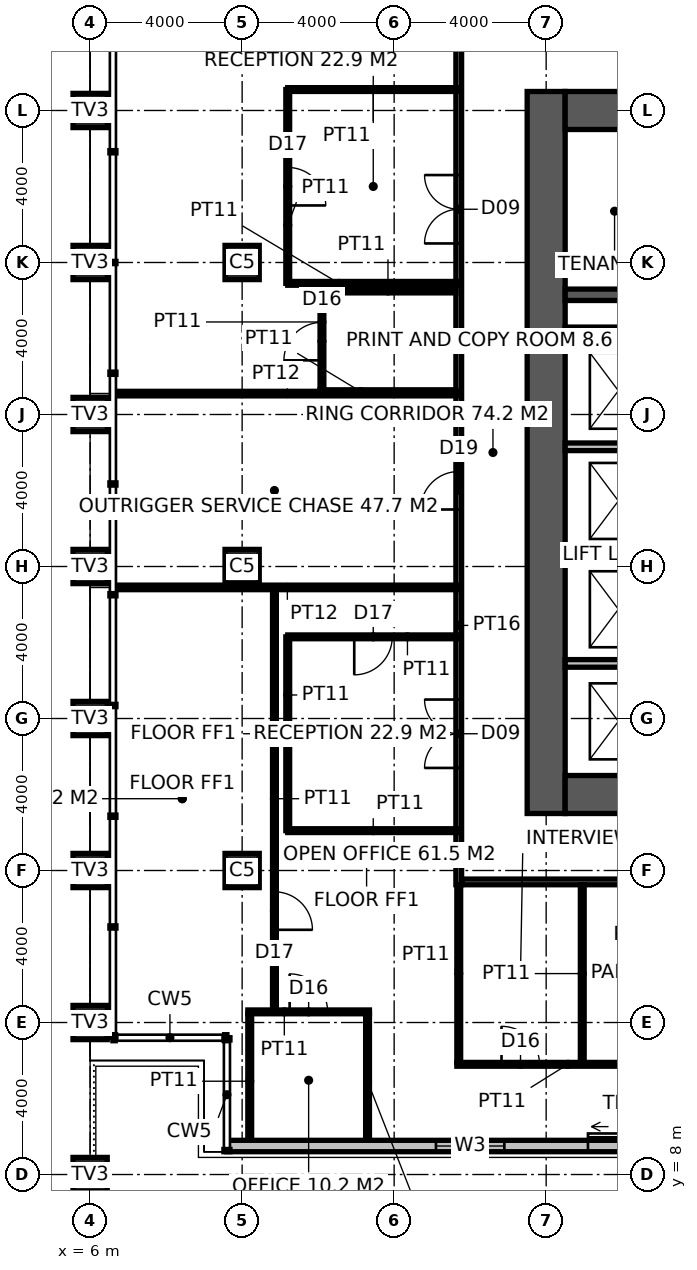
"""IFC4 building model, lengths in metres.
Left out: names, types, materials, properties, quantities, classifications, styles, units other than length and angle.
Written with IfcOpenShell. Run it as: python <this file> out.ifc"""

import sys

from ifc_helpers import new_model, si_unit, direction, frame, frame_2d, origin, origin_2d, place, context, subcontext, project, spatial, rectangle, hollow_rectangle, extrude, element, fill, save


model = new_model("IFC4")
c1 = context("Model", 3, precision=1e-05, world=origin(), true_north=direction((0.0, 1.0)))
c2 = subcontext(c1, "Body", "Model", "MODEL_VIEW")
j1 = project(units=[si_unit("LENGTHUNIT", "METRE"), si_unit("PLANEANGLEUNIT", "RADIAN")], contexts=[c1])
p1 = place(None, origin())
s1 = spatial("IfcSite", under=j1, at=p1, CompositionType="ELEMENT")
p2 = place(p1, origin())
s2 = spatial("IfcBuilding", under=s1, at=p2, CompositionType="ELEMENT")
p3 = place(p2, frame((0.0, 0.0, 171.8)))
s3 = spatial("IfcBuildingStorey", under=s2, at=p3, CompositionType="ELEMENT", Elevation=171.8)
for number, where, z_axis, x_axis in (
    (1, (6.0, 8.0, 0.0), (0.0, 0.0, 1.0), (1.0, 0.0, 0.0)),
    (2, (6.0, 12.0, 0.0), (0.0, 0.0, 1.0), (1.0, 0.0, 0.0)),
    (3, (6.0, 16.0, 0.0), (0.0, 0.0, 1.0), (1.0, 0.0, 0.0)),
    (4, (6.0, 20.0, 0.0), (0.0, 0.0, 1.0), (1.0, 0.0, 0.0)),
    (5, (6.0, 24.0, 0.0), (0.0, 0.0, 1.0), (1.0, 0.0, 0.0)),
    (6, (6.0, 28.0, 0.0), (0.0, 0.0, 1.0), (1.0, 0.0, 0.0)),
    (7, (6.0, 32.0, 0.0), (0.0, 0.0, 1.0), (1.0, 0.0, 0.0)),
    (8, (6.0, 36.0, 0.0), (0.0, 0.0, 1.0), (1.0, 0.0, 0.0)),
):
    element("IfcColumn", number, at=place(p3, frame(where, z_axis=z_axis, x_axis=x_axis)), inside=s3, PredefinedType="USERDEFINED", context=c2, shape_type="SweptSolid", body=[
        extrude(hollow_rectangle(XDim=0.9, YDim=0.9, WallThickness=0.08, at=origin_2d()), origin(), (0.0, 0.0, 1.0), 4.0),
    ])
for number, where, z_axis, x_axis in (
    (9, (10.0, 16.0, 0.0), (0.0, 0.0, 1.0), (1.0, 0.0, 0.0)),
    (10, (10.0, 24.0, 0.0), (0.0, 0.0, 1.0), (1.0, 0.0, 0.0)),
    (11, (10.0, 32.0, 0.0), (0.0, 0.0, 1.0), (1.0, 0.0, 0.0)),
):
    element("IfcColumn", number, at=place(p3, frame(where, z_axis=z_axis, x_axis=x_axis)), inside=s3, PredefinedType="COLUMN", context=c2, shape_type="SweptSolid", body=[
        extrude(hollow_rectangle(XDim=0.9, YDim=0.9, WallThickness=0.1, at=origin_2d()), origin(), (0.0, 0.0, 1.0), 4.0),
    ])
p4 = place(p3, frame((18.0, 17.5, -0.15), z_axis=(0.0, 0.0, 1.0), x_axis=(0.0, 1.0, 0.0)))
e12 = element("IfcWall", 12, at=p4, inside=s3, PredefinedType="SHEAR", context=c2, shape_type="SweptSolid", body=[
    extrude(rectangle(XDim=19.0, YDim=1.0, at=frame_2d((9.5, 0.0))), origin(), (0.0, 0.0, 1.0), 4.0),
])
p5 = place(p3, frame((18.5, 18.0, -0.15), z_axis=(0.0, 0.0, 1.0), x_axis=(1.0, 0.0, 0.0)))
e13 = element("IfcWall", 13, at=p5, inside=s3, PredefinedType="SHEAR", context=c2, shape_type="SweptSolid", body=[
    extrude(rectangle(XDim=17.6, YDim=1.0, at=frame_2d((8.8, 0.0))), origin(), (0.0, 0.0, 1.0), 4.0),
])
p6 = place(p5, frame((3.45, 0.0, 0.15)))
e14 = element("IfcOpeningElement", 14, at=p6, cuts=e13, PredefinedType="OPENING", context=c2, shape_type="SweptSolid", body=[
    extrude(rectangle(XDim=1.5, YDim=2.4, at=frame_2d((0.75, 1.2))), frame((0.0, 0.51, 0.0), z_axis=(0.0, -1.0, 0.0), x_axis=(1.0, 0.0, 0.0)), (0.0, 0.0, 1.0), 1.02),
])
p7 = place(p3, frame((18.5, 36.0, -0.15), z_axis=(0.0, 0.0, 1.0), x_axis=(1.0, 0.0, 0.0)))
e15 = element("IfcWall", 15, at=p7, inside=s3, PredefinedType="SHEAR", context=c2, shape_type="SweptSolid", body=[
    extrude(rectangle(XDim=17.6, YDim=1.0, at=frame_2d((8.8, 0.0))), origin(), (0.0, 0.0, 1.0), 4.0),
])
p8 = place(p3, frame((18.5, 31.15, -0.15), z_axis=(0.0, 0.0, 1.0), x_axis=(1.0, 0.0, 0.0)))
e16 = element("IfcWall", 16, at=p8, inside=s3, PredefinedType="SHEAR", context=c2, shape_type="SweptSolid", body=[
    extrude(rectangle(XDim=5.35, YDim=0.3, at=frame_2d((2.675, 0.0))), origin(), (0.0, 0.0, 1.0), 4.0),
])
p9 = place(p8, frame((3.4, 0.0, 0.15)))
e17 = element("IfcOpeningElement", 17, at=p9, cuts=e16, PredefinedType="OPENING", context=c2, shape_type="SweptSolid", body=[
    extrude(rectangle(XDim=1.0, YDim=2.2, at=frame_2d((0.5, 1.1))), frame((0.0, 0.16, 0.0), z_axis=(0.0, -1.0, 0.0), x_axis=(1.0, 0.0, 0.0)), (0.0, 0.0, 1.0), 0.32),
])
p10 = place(p3, frame((18.5, 30.15, -0.15), z_axis=(0.0, 0.0, 1.0), x_axis=(1.0, 0.0, 0.0)))
e18 = element("IfcWall", 18, at=p10, inside=s3, PredefinedType="SHEAR", context=c2, shape_type="SweptSolid", body=[
    extrude(rectangle(XDim=2.7, YDim=0.3, at=frame_2d((1.35, 0.0))), origin(), (0.0, 0.0, 1.0), 4.0),
])
for number, where, z_axis, x_axis in (
    (19, (18.5, 21.45, -0.15), (0.0, 0.0, 1.0), (1.0, 0.0, 0.0)),
    (20, (18.5, 24.3, -0.15), (0.0, 0.0, 1.0), (1.0, 0.0, 0.0)),
    (21, (18.5, 27.15, -0.15), (0.0, 0.0, 1.0), (1.0, 0.0, 0.0)),
):
    element("IfcWall", number, at=place(p3, frame(where, z_axis=z_axis, x_axis=x_axis)), inside=s3, PredefinedType="SOLIDWALL", context=c2, shape_type="SweptSolid", body=[
        extrude(rectangle(XDim=2.7, YDim=0.2, at=frame_2d((1.35, 0.0))), origin(), (0.0, 0.0, 1.0), 4.0),
    ])
p11 = place(p3, frame((15.7, 15.625, 0.0), z_axis=(0.0, 0.0, 1.0), x_axis=(0.0, 1.0, 0.0)))
e22 = element("IfcWall", 22, at=p11, inside=s3, PredefinedType="PARTITIONING", context=c2, shape_type="SweptSolid", body=[
    extrude(rectangle(XDim=22.75, YDim=0.15, at=frame_2d((11.375, 0.0))), origin(), (0.0, 0.0, 1.0), 3.85),
])
p12 = place(p11, frame((3.074, 0.0, 0.0)))
e23 = element("IfcOpeningElement", 23, at=p12, cuts=e22, PredefinedType="OPENING", context=c2, shape_type="SweptSolid", body=[
    extrude(rectangle(XDim=1.8, YDim=2.4, at=frame_2d((0.9, 1.2))), frame((0.0, 0.085, 0.0), z_axis=(0.0, -1.0, 0.0), x_axis=(1.0, 0.0, 0.0)), (0.0, 0.0, 1.0), 0.17),
])
p13 = place(p11, frame((16.876, 0.0, 0.0)))
e24 = element("IfcOpeningElement", 24, at=p13, cuts=e22, PredefinedType="OPENING", context=c2, shape_type="SweptSolid", body=[
    extrude(rectangle(XDim=1.8, YDim=2.4, at=frame_2d((0.9, 1.2))), frame((0.0, 0.085, 0.0), z_axis=(0.0, -1.0, 0.0), x_axis=(1.0, 0.0, 0.0)), (0.0, 0.0, 1.0), 0.17),
])
p14 = place(p11, frame((9.875, 0.0, 0.0)))
e25 = element("IfcOpeningElement", 25, at=p14, cuts=e22, PredefinedType="OPENING", context=c2, shape_type="SweptSolid", body=[
    extrude(rectangle(XDim=1.0, YDim=2.2, at=frame_2d((0.5, 1.1))), frame((0.0, 0.085, 0.0), z_axis=(0.0, -1.0, 0.0), x_axis=(1.0, 0.0, 0.0)), (0.0, 0.0, 1.0), 0.17),
])
p15 = place(p3, frame((15.775, 15.7, 0.0), z_axis=(0.0, 0.0, 1.0), x_axis=(1.0, 0.0, 0.0)))
e26 = element("IfcWall", 26, at=p15, inside=s3, PredefinedType="PARTITIONING", context=c2, shape_type="SweptSolid", body=[
    extrude(rectangle(XDim=22.05, YDim=0.15, at=frame_2d((11.025, 0.0))), origin(), (0.0, 0.0, 1.0), 3.85),
])
p16 = place(p15, frame((11.725, 0.0, 0.0)))
e27 = element("IfcOpeningElement", 27, at=p16, cuts=e26, PredefinedType="OPENING", context=c2, shape_type="SweptSolid", body=[
    extrude(rectangle(XDim=1.0, YDim=2.2, at=frame_2d((0.5, 1.1))), frame((0.0, 0.085, 0.0), z_axis=(0.0, -1.0, 0.0), x_axis=(1.0, 0.0, 0.0)), (0.0, 0.0, 1.0), 0.17),
])
for number, where, z_axis, x_axis in (
    (28, (6.68, 23.45, 0.0), (0.0, 0.0, 1.0), (1.0, 0.0, 0.0)),
    (29, (6.68, 28.55, 0.0), (0.0, 0.0, 1.0), (1.0, 0.0, 0.0)),
):
    element("IfcWall", number, at=place(p3, frame(where, z_axis=z_axis, x_axis=x_axis)), inside=s3, PredefinedType="PARTITIONING", context=c2, shape_type="SweptSolid", body=[
        extrude(rectangle(XDim=9.02, YDim=0.12, at=frame_2d((4.51, 0.0))), origin(), (0.0, 0.0, 1.0), 2.65),
    ])
p17 = place(p3, frame((15.65, 10.9, 0.0), z_axis=(0.0, 0.0, 1.0), x_axis=(1.0, 0.0, 0.0)))
e30 = element("IfcWall", 30, at=p17, inside=s3, PredefinedType="PARTITIONING", context=c2, shape_type="SweptSolid", body=[
    extrude(rectangle(XDim=9.739, YDim=0.1, at=frame_2d((4.87, 0.0))), origin(), (0.0, 0.0, 1.0), 3.85),
])
p18 = place(p17, frame((1.175, 0.0, 0.0)))
e31 = element("IfcOpeningElement", 31, at=p18, cuts=e30, PredefinedType="OPENING", context=c2, shape_type="SweptSolid", body=[
    extrude(rectangle(XDim=1.0, YDim=2.2, at=frame_2d((0.5, 1.1))), frame((0.0, 0.06, 0.0), z_axis=(0.0, -1.0, 0.0), x_axis=(1.0, 0.0, 0.0)), (0.0, 0.0, 1.0), 0.12),
])
p19 = place(p17, frame((4.5, 0.0, 0.0)))
e32 = element("IfcOpeningElement", 32, at=p19, cuts=e30, PredefinedType="OPENING", context=c2, shape_type="SweptSolid", body=[
    extrude(rectangle(XDim=1.0, YDim=2.2, at=frame_2d((0.5, 1.1))), frame((0.0, 0.06, 0.0), z_axis=(0.0, -1.0, 0.0), x_axis=(1.0, 0.0, 0.0)), (0.0, 0.0, 1.0), 0.12),
])
p20 = place(p17, frame((7.75, 0.0, 0.0)))
e33 = element("IfcOpeningElement", 33, at=p20, cuts=e30, PredefinedType="OPENING", context=c2, shape_type="SweptSolid", body=[
    extrude(rectangle(XDim=1.0, YDim=2.2, at=frame_2d((0.5, 1.1))), frame((0.0, 0.06, 0.0), z_axis=(0.0, -1.0, 0.0), x_axis=(1.0, 0.0, 0.0)), (0.0, 0.0, 1.0), 0.12),
])
p21 = place(p3, frame((10.15, 12.28, 0.0), z_axis=(0.0, 0.0, 1.0), x_axis=(1.0, 0.0, 0.0)))
e34 = element("IfcWall", 34, at=p21, inside=s3, PredefinedType="PARTITIONING", context=c2, shape_type="SweptSolid", body=[
    extrude(rectangle(XDim=3.2, YDim=0.1, at=frame_2d((1.6, 0.0))), origin(), (0.0, 0.0, 1.0), 3.85),
])
p22 = place(p21, frame((1.1, 0.0, 0.0)))
e35 = element("IfcOpeningElement", 35, at=p22, cuts=e34, PredefinedType="OPENING", context=c2, shape_type="SweptSolid", body=[
    extrude(rectangle(XDim=1.0, YDim=2.2, at=frame_2d((0.5, 1.1))), frame((0.0, 0.06, 0.0), z_axis=(0.0, -1.0, 0.0), x_axis=(1.0, 0.0, 0.0)), (0.0, 0.0, 1.0), 0.12),
])
p23 = place(p3, frame((12.05, 28.6, 0.0), z_axis=(0.0, 0.0, 1.0), x_axis=(1.0, 0.0, 0.0)))
e36 = element("IfcWall", 36, at=p23, inside=s3, PredefinedType="PARTITIONING", context=c2, shape_type="SweptSolid", body=[
    extrude(rectangle(XDim=3.575, YDim=0.1, at=frame_2d((1.788, 0.0))), origin(), (0.0, 0.0, 1.0), 2.65),
])
p24 = place(p3, frame((12.05, 31.25, 0.0), z_axis=(0.0, 0.0, 1.0), x_axis=(1.0, 0.0, 0.0)))
e37 = element("IfcWall", 37, at=p24, inside=s3, PredefinedType="PARTITIONING", context=c2, shape_type="SweptSolid", body=[
    extrude(rectangle(XDim=3.575, YDim=0.1, at=frame_2d((1.788, 0.0))), origin(), (0.0, 0.0, 1.0), 3.85),
])
p25 = place(p3, frame((10.2, 8.68, 0.0), z_axis=(0.0, 0.0, 1.0), x_axis=(0.0, 1.0, 0.0)))
e38 = element("IfcWall", 38, at=p25, inside=s3, PredefinedType="PARTITIONING", context=c2, shape_type="SweptSolid", body=[
    extrude(rectangle(XDim=3.55, YDim=0.1, at=frame_2d((1.775, 0.0))), origin(), (0.0, 0.0, 1.0), 2.65),
])
p26 = place(p3, frame((12.1, 28.65, 0.0), z_axis=(0.0, 0.0, 1.0), x_axis=(0.0, 1.0, 0.0)))
e39 = element("IfcWall", 39, at=p26, inside=s3, PredefinedType="PARTITIONING", context=c2, shape_type="SweptSolid", body=[
    extrude(rectangle(XDim=2.55, YDim=0.1, at=frame_2d((1.275, 0.0))), origin(), (0.0, 0.0, 1.0), 3.85),
])
p27 = place(p26, frame((0.775, 0.0, 0.0)))
e40 = element("IfcOpeningElement", 40, at=p27, cuts=e39, PredefinedType="OPENING", context=c2, shape_type="SweptSolid", body=[
    extrude(rectangle(XDim=1.0, YDim=2.2, at=frame_2d((0.5, 1.1))), frame((0.0, 0.06, 0.0), z_axis=(0.0, -1.0, 0.0), x_axis=(1.0, 0.0, 0.0)), (0.0, 0.0, 1.0), 0.12),
])
p28 = place(p3, frame((13.3, 8.68, 0.0), z_axis=(0.0, 0.0, 1.0), x_axis=(0.0, 1.0, 0.0)))
e41 = element("IfcWall", 41, at=p28, inside=s3, PredefinedType="PARTITIONING", context=c2, shape_type="SweptSolid", body=[
    extrude(rectangle(XDim=3.55, YDim=0.1, at=frame_2d((1.775, 0.0))), origin(), (0.0, 0.0, 1.0), 3.85),
])
for number, where, z_axis, x_axis in (
    (42, (15.7, 10.95, 0.0), (0.0, 0.0, 1.0), (0.0, 1.0, 0.0)),
    (43, (18.95, 10.95, 0.0), (0.0, 0.0, 1.0), (0.0, 1.0, 0.0)),
):
    element("IfcWall", number, at=place(p3, frame(where, z_axis=z_axis, x_axis=x_axis)), inside=s3, PredefinedType="PARTITIONING", context=c2, shape_type="SweptSolid", body=[
        extrude(rectangle(XDim=4.675, YDim=0.1, at=frame_2d((2.337, 0.0))), origin(), (0.0, 0.0, 1.0), 3.85),
    ])
p29 = place(p3, frame((10.85, 23.449, 0.0), z_axis=(0.0, 0.0, 1.0), x_axis=(0.0, -1.0, 0.0)))
e44 = element("IfcWall", 44, at=p29, inside=s3, PredefinedType="PARTITIONING", context=c2, shape_type="SweptSolid", body=[
    extrude(rectangle(XDim=11.119, YDim=0.1, at=frame_2d((5.56, 0.0))), origin(), (0.0, 0.0, 1.0), 3.85),
])
p30 = place(p29, frame((8.01, 0.0, 0.0)))
e45 = element("IfcOpeningElement", 45, at=p30, cuts=e44, PredefinedType="OPENING", context=c2, shape_type="SweptSolid", body=[
    extrude(rectangle(XDim=1.0, YDim=2.2, at=frame_2d((0.5, 1.1))), frame((0.0, 0.06, 0.0), z_axis=(0.0, -1.0, 0.0), x_axis=(1.0, 0.0, 0.0)), (0.0, 0.0, 1.0), 0.12),
])
p31 = place(p3, frame((15.7, 22.149, 0.0), z_axis=(0.0, 0.0, 1.0), x_axis=(-1.0, 0.0, 0.0)))
e46 = element("IfcWall", 46, at=p31, inside=s3, PredefinedType="PARTITIONING", context=c2, shape_type="SweptSolid", body=[
    extrude(rectangle(XDim=4.5, YDim=0.1, at=frame_2d((2.25, 0.0))), origin(), (0.0, 0.0, 1.0), 3.85),
])
p32 = place(p31, frame((1.75, 0.0, 0.0)))
e47 = element("IfcOpeningElement", 47, at=p32, cuts=e46, PredefinedType="OPENING", context=c2, shape_type="SweptSolid", body=[
    extrude(rectangle(XDim=1.0, YDim=2.2, at=frame_2d((0.5, 1.1))), frame((0.0, 0.06, 0.0), z_axis=(0.0, -1.0, 0.0), x_axis=(1.0, 0.0, 0.0)), (0.0, 0.0, 1.0), 0.12),
])
p33 = place(p3, frame((11.2, 22.149, 0.0), z_axis=(0.0, 0.0, 1.0), x_axis=(0.0, -1.0, 0.0)))
e48 = element("IfcWall", 48, at=p33, inside=s3, PredefinedType="PARTITIONING", context=c2, shape_type="SweptSolid", body=[
    extrude(rectangle(XDim=5.1, YDim=0.1, at=frame_2d((2.55, 0.0))), origin(), (0.0, 0.0, 1.0), 3.85),
])
for number, where, z_axis, x_axis in (
    (49, (11.2, 17.049, 0.0), (0.0, 0.0, 1.0), (1.0, 0.0, 0.0)),
    (50, (15.7, 36.551, 0.0), (0.0, 0.0, 1.0), (-1.0, 0.0, 0.0)),
):
    element("IfcWall", number, at=place(p3, frame(where, z_axis=z_axis, x_axis=x_axis)), inside=s3, PredefinedType="PARTITIONING", context=c2, shape_type="SweptSolid", body=[
        extrude(rectangle(XDim=4.5, YDim=0.1, at=frame_2d((2.25, 0.0))), origin(), (0.0, 0.0, 1.0), 3.85),
    ])
p34 = place(p3, frame((11.2, 36.551, 0.0), z_axis=(0.0, 0.0, 1.0), x_axis=(0.0, -1.0, 0.0)))
e51 = element("IfcWall", 51, at=p34, inside=s3, PredefinedType="PARTITIONING", context=c2, shape_type="SweptSolid", body=[
    extrude(rectangle(XDim=5.1, YDim=0.1, at=frame_2d((2.55, 0.0))), origin(), (0.0, 0.0, 1.0), 3.85),
])
p35 = place(p34, frame((2.05, 0.0, 0.0)))
e52 = element("IfcOpeningElement", 52, at=p35, cuts=e51, PredefinedType="OPENING", context=c2, shape_type="SweptSolid", body=[
    extrude(rectangle(XDim=1.0, YDim=2.2, at=frame_2d((0.5, 1.1))), frame((0.0, 0.06, 0.0), z_axis=(0.0, -1.0, 0.0), x_axis=(1.0, 0.0, 0.0)), (0.0, 0.0, 1.0), 0.12),
])
p36 = place(p3, frame((11.2, 31.451, 0.0), z_axis=(0.0, 0.0, 1.0), x_axis=(1.0, 0.0, 0.0)))
e53 = element("IfcWall", 53, at=p36, inside=s3, PredefinedType="PARTITIONING", context=c2, shape_type="SweptSolid", body=[
    extrude(rectangle(XDim=4.5, YDim=0.1, at=frame_2d((2.25, 0.0))), origin(), (0.0, 0.0, 1.0), 3.85),
])
p37 = place(p3, frame((9.6, 8.75, 0.0), z_axis=(0.0, 0.0, 1.0), x_axis=(1.0, 0.0, 0.0)))
e54 = element("IfcWall", 54, at=p37, inside=s3, PredefinedType="ELEMENTEDWALL", context=c2, shape_type="SweptSolid", body=[
    extrude(rectangle(XDim=32.8, YDim=0.3, at=frame_2d((16.4, 0.0))), origin(), (0.0, 0.0, 1.0), 3.85),
])
p38 = place(p37, frame((5.5, 0.0, 0.8)))
e55 = element("IfcOpeningElement", 55, at=p38, cuts=e54, PredefinedType="OPENING", context=c2, shape_type="SweptSolid", body=[
    extrude(rectangle(XDim=1.8, YDim=2.4, at=frame_2d((0.9, 1.2))), frame((0.0, 0.16, 0.0), z_axis=(0.0, -1.0, 0.0), x_axis=(1.0, 0.0, 0.0)), (0.0, 0.0, 1.0), 0.32),
])
p39 = place(p37, frame((9.5, 0.0, 0.0)))
e56 = element("IfcOpeningElement", 56, at=p39, cuts=e54, PredefinedType="OPENING", context=c2, shape_type="SweptSolid", body=[
    extrude(rectangle(XDim=1.8, YDim=2.4, at=frame_2d((0.9, 1.2))), frame((0.0, 0.16, 0.0), z_axis=(0.0, -1.0, 0.0), x_axis=(1.0, 0.0, 0.0)), (0.0, 0.0, 1.0), 0.32),
])
p40 = place(p37, frame((13.5, 0.0, 0.8)))
e57 = element("IfcOpeningElement", 57, at=p40, cuts=e54, PredefinedType="OPENING", context=c2, shape_type="SweptSolid", body=[
    extrude(rectangle(XDim=1.8, YDim=2.4, at=frame_2d((0.9, 1.2))), frame((0.0, 0.16, 0.0), z_axis=(0.0, -1.0, 0.0), x_axis=(1.0, 0.0, 0.0)), (0.0, 0.0, 1.0), 0.32),
])
p41 = place(p37, frame((17.2, 0.0, 0.8)))
e58 = element("IfcOpeningElement", 58, at=p41, cuts=e54, PredefinedType="OPENING", context=c2, shape_type="SweptSolid", body=[
    extrude(rectangle(XDim=1.0, YDim=2.4, at=frame_2d((0.5, 1.2))), frame((0.0, 0.16, 0.0), z_axis=(0.0, -1.0, 0.0), x_axis=(1.0, 0.0, 0.0)), (0.0, 0.0, 1.0), 0.32),
])
p42 = place(p37, frame((18.6, 0.0, 0.8)))
e59 = element("IfcOpeningElement", 59, at=p42, cuts=e54, PredefinedType="OPENING", context=c2, shape_type="SweptSolid", body=[
    extrude(rectangle(XDim=1.0, YDim=2.4, at=frame_2d((0.5, 1.2))), frame((0.0, 0.16, 0.0), z_axis=(0.0, -1.0, 0.0), x_axis=(1.0, 0.0, 0.0)), (0.0, 0.0, 1.0), 0.32),
])
p43 = place(p37, frame((21.5, 0.0, 0.0)))
e60 = element("IfcOpeningElement", 60, at=p43, cuts=e54, PredefinedType="OPENING", context=c2, shape_type="SweptSolid", body=[
    extrude(rectangle(XDim=1.8, YDim=2.4, at=frame_2d((0.9, 1.2))), frame((0.0, 0.16, 0.0), z_axis=(0.0, -1.0, 0.0), x_axis=(1.0, 0.0, 0.0)), (0.0, 0.0, 1.0), 0.32),
])
p44 = place(p37, frame((25.5, 0.0, 0.8)))
e61 = element("IfcOpeningElement", 61, at=p44, cuts=e54, PredefinedType="OPENING", context=c2, shape_type="SweptSolid", body=[
    extrude(rectangle(XDim=1.8, YDim=2.4, at=frame_2d((0.9, 1.2))), frame((0.0, 0.16, 0.0), z_axis=(0.0, -1.0, 0.0), x_axis=(1.0, 0.0, 0.0)), (0.0, 0.0, 1.0), 0.32),
])
p45 = place(p12, origin())
e62 = element("IfcDoor", 62, at=p45, inside=s3, OperationType="DOUBLE_DOOR_DOUBLE_SWING", PredefinedType="DOOR", context=c2, shape_type="SweptSolid", body=[
    extrude(rectangle(XDim=1.8, YDim=2.4, at=frame_2d((0.9, 1.2))), frame((0.0, 0.025, 0.0), z_axis=(0.0, -1.0, 0.0), x_axis=(1.0, 0.0, 0.0)), (0.0, 0.0, 1.0), 0.05),
])
fill(e23, e62)
p46 = place(p13, origin())
e63 = element("IfcDoor", 63, at=p46, inside=s3, OperationType="DOUBLE_DOOR_DOUBLE_SWING", PredefinedType="DOOR", context=c2, shape_type="SweptSolid", body=[
    extrude(rectangle(XDim=1.8, YDim=2.4, at=frame_2d((0.9, 1.2))), frame((0.0, 0.025, 0.0), z_axis=(0.0, -1.0, 0.0), x_axis=(1.0, 0.0, 0.0)), (0.0, 0.0, 1.0), 0.05),
])
fill(e24, e63)
p47 = place(p14, origin())
e64 = element("IfcDoor", 64, at=p47, inside=s3, OperationType="SINGLE_SWING_LEFT", PredefinedType="DOOR", context=c2, shape_type="SweptSolid", body=[
    extrude(rectangle(XDim=1.0, YDim=2.2, at=frame_2d((0.5, 1.1))), frame((0.0, 0.025, 0.0), z_axis=(0.0, -1.0, 0.0), x_axis=(1.0, 0.0, 0.0)), (0.0, 0.0, 1.0), 0.05),
])
fill(e25, e64)
p48 = place(p18, origin())
e65 = element("IfcDoor", 65, at=p48, inside=s3, OperationType="SINGLE_SWING_LEFT", PredefinedType="DOOR", context=c2, shape_type="SweptSolid", body=[
    extrude(rectangle(XDim=1.0, YDim=2.2, at=frame_2d((0.5, 1.1))), frame((0.0, 0.025, 0.0), z_axis=(0.0, -1.0, 0.0), x_axis=(1.0, 0.0, 0.0)), (0.0, 0.0, 1.0), 0.05),
])
fill(e31, e65)
p49 = place(p22, origin())
e66 = element("IfcDoor", 66, at=p49, inside=s3, OperationType="SINGLE_SWING_LEFT", PredefinedType="DOOR", context=c2, shape_type="SweptSolid", body=[
    extrude(rectangle(XDim=1.0, YDim=2.2, at=frame_2d((0.5, 1.1))), frame((0.0, 0.025, 0.0), z_axis=(0.0, -1.0, 0.0), x_axis=(1.0, 0.0, 0.0)), (0.0, 0.0, 1.0), 0.05),
])
fill(e35, e66)
p50 = place(p27, origin())
e67 = element("IfcDoor", 67, at=p50, inside=s3, OperationType="SINGLE_SWING_LEFT", PredefinedType="DOOR", context=c2, shape_type="SweptSolid", body=[
    extrude(rectangle(XDim=1.0, YDim=2.2, at=frame_2d((0.5, 1.1))), frame((0.0, 0.025, 0.0), z_axis=(0.0, -1.0, 0.0), x_axis=(1.0, 0.0, 0.0)), (0.0, 0.0, 1.0), 0.05),
])
fill(e40, e67)
p51 = place(p30, origin())
e68 = element("IfcDoor", 68, at=p51, inside=s3, OperationType="SINGLE_SWING_RIGHT", PredefinedType="DOOR", context=c2, shape_type="SweptSolid", body=[
    extrude(rectangle(XDim=1.0, YDim=2.2, at=frame_2d((0.5, 1.1))), frame((0.0, 0.025, 0.0), z_axis=(0.0, -1.0, 0.0), x_axis=(1.0, 0.0, 0.0)), (0.0, 0.0, 1.0), 0.05),
])
fill(e45, e68)
p52 = place(p32, origin())
e69 = element("IfcDoor", 69, at=p52, inside=s3, OperationType="SINGLE_SWING_RIGHT", PredefinedType="DOOR", context=c2, shape_type="SweptSolid", body=[
    extrude(rectangle(XDim=1.0, YDim=2.2, at=frame_2d((0.5, 1.1))), frame((0.0, 0.025, 0.0), z_axis=(0.0, -1.0, 0.0), x_axis=(1.0, 0.0, 0.0)), (0.0, 0.0, 1.0), 0.05),
])
fill(e47, e69)
p53 = place(p35, origin())
e70 = element("IfcDoor", 70, at=p53, inside=s3, OperationType="SINGLE_SWING_RIGHT", PredefinedType="DOOR", context=c2, shape_type="SweptSolid", body=[
    extrude(rectangle(XDim=1.0, YDim=2.2, at=frame_2d((0.5, 1.1))), frame((0.0, 0.025, 0.0), z_axis=(0.0, -1.0, 0.0), x_axis=(1.0, 0.0, 0.0)), (0.0, 0.0, 1.0), 0.05),
])
fill(e52, e70)
p54 = place(p38, origin())
e71 = element("IfcWindow", 71, at=p54, inside=s3, PartitioningType="SINGLE_PANEL", PredefinedType="WINDOW", context=c2, shape_type="SweptSolid", body=[
    extrude(rectangle(XDim=1.8, YDim=2.4, at=frame_2d((0.9, 1.2))), frame((0.0, 0.03, 0.0), z_axis=(0.0, -1.0, 0.0), x_axis=(1.0, 0.0, 0.0)), (0.0, 0.0, 1.0), 0.06),
])
fill(e55, e71)
p55 = place(p39, origin())
e72 = element("IfcDoor", 72, at=p55, inside=s3, OperationType="DOUBLE_DOOR_SLIDING", PredefinedType="DOOR", context=c2, shape_type="SweptSolid", body=[
    extrude(rectangle(XDim=1.8, YDim=2.4, at=frame_2d((0.9, 1.2))), frame((0.0, 0.025, 0.0), z_axis=(0.0, -1.0, 0.0), x_axis=(1.0, 0.0, 0.0)), (0.0, 0.0, 1.0), 0.05),
])
fill(e56, e72)
save(model, sys.argv[1])
